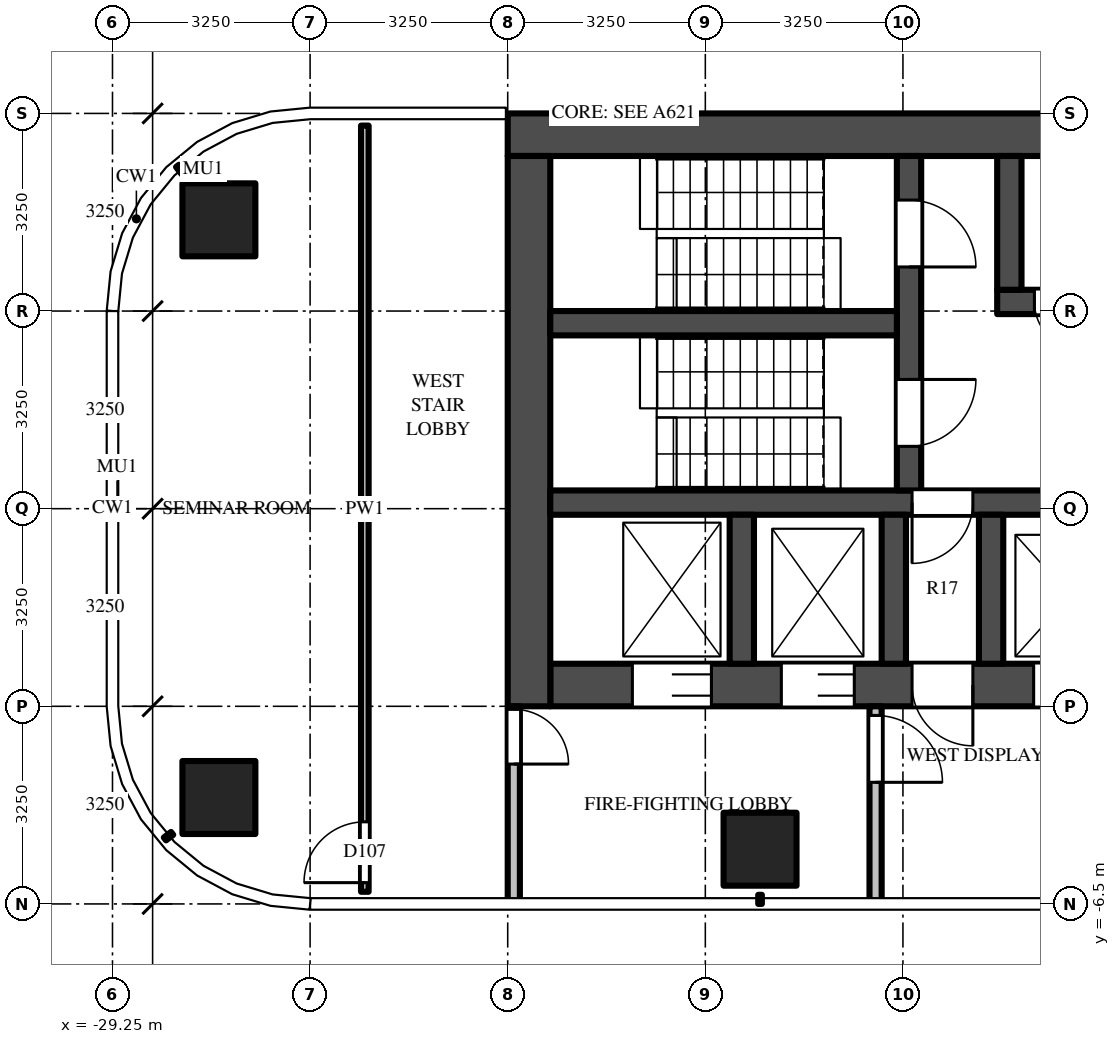
"""IFC4 building model, lengths in metres.
Left out: names, types, materials, properties, quantities, classifications, styles, units other than length and angle.
Written with IfcOpenShell. Run it as: python <this file> out.ifc"""

import sys

from ifc_helpers import new_model, si_unit, direction, frame, frame_2d, origin, origin_2d, place, context, subcontext, project, spatial, rectangle, extrude, source, transform, mapped, element, fill, save


model = new_model("IFC4")
c1 = context("Model", 3, precision=1e-05, world=origin(), true_north=direction((0.0, 1.0)))
c2 = subcontext(c1, "Body", "Model", "MODEL_VIEW")
j1 = project(units=[si_unit("LENGTHUNIT", "METRE"), si_unit("PLANEANGLEUNIT", "RADIAN")], contexts=[c1])
p1 = place(None, origin())
s1 = spatial("IfcSite", under=j1, at=p1, CompositionType="ELEMENT")
p2 = place(p1, origin())
s2 = spatial("IfcBuilding", under=s1, at=p2, CompositionType="ELEMENT")
p3 = place(p2, frame((0.0, 0.0, 173.7)))
s3 = spatial("IfcBuildingStorey", under=s2, at=p3, CompositionType="ELEMENT", Elevation=173.7)
m1 = source(origin(), c2, "Body", "SweptSolid", [
    extrude(rectangle(XDim=1.2, YDim=1.2, at=origin_2d()), origin(), (0.0, 0.0, 1.0), 3.9),
])
for number, where, z_axis, x_axis in (
    (1, (-18.6, -5.6, 0.0), (0.0, 0.0, 1.0), (1.0, 0.0, 0.0)),
    (2, (-27.5, -4.75, 0.0), (0.0, 0.0, 1.0), (1.0, 0.0, 0.0)),
    (3, (-27.5, 4.75, 0.0), (0.0, 0.0, 1.0), (1.0, 0.0, 0.0)),
):
    element("IfcColumn", number, at=place(p3, frame(where, z_axis=z_axis, x_axis=x_axis)), inside=s3, PredefinedType="COLUMN", context=c2, shape_type="MappedRepresentation", body=[
        mapped(m1, transform((0.0, 0.0, 0.0))),
    ])
m2 = source(origin(), c2, "Body", "SweptSolid", [
    extrude(rectangle(XDim=16.55, YDim=0.7, at=frame_2d((8.275, 0.0))), origin(), (0.0, 0.0, 1.0), 3.7),
])
p4 = place(p3, frame((-6.2, 6.15, 0.0), z_axis=(0.0, 0.0, 1.0), x_axis=(-1.0, 0.0, 0.0)))
e4 = element("IfcWall", 4, at=p4, inside=s3, PredefinedType="SHEAR", context=c2, shape_type="MappedRepresentation", body=[
    mapped(m2, transform((0.0, 0.0, 0.0))),
])
m3 = source(origin(), c2, "Body", "SweptSolid", [
    extrude(rectangle(XDim=14.85, YDim=0.7, at=frame_2d((7.425, 0.0))), origin(), (0.0, 0.0, 1.0), 3.7),
])
p5 = place(p3, frame((-7.2, -2.9, 0.0), z_axis=(0.0, 0.0, 1.0), x_axis=(-1.0, 0.0, 0.0)))
e5 = element("IfcWall", 5, at=p5, inside=s3, PredefinedType="SHEAR", context=c2, shape_type="MappedRepresentation", body=[
    mapped(m3, transform((0.0, 0.0, 0.0))),
])
m4 = source(origin(), c2, "Body", "SweptSolid", [
    extrude(rectangle(XDim=1.1, YDim=2.1, at=frame_2d((0.55, 1.05))), frame((0.0, 0.36, 0.0), z_axis=(0.0, -1.0, 0.0), x_axis=(1.0, 0.0, 0.0)), (0.0, 0.0, 1.0), 0.72),
])
p6 = place(p5, frame((0.55, 0.0, 0.0)))
e6 = element("IfcOpeningElement", 6, at=p6, cuts=e5, PredefinedType="OPENING", context=c2, shape_type="MappedRepresentation", body=[
    mapped(m4, transform((0.0, 0.0, 0.0))),
])
p7 = place(p5, frame((3.15, 0.0, 0.0)))
e7 = element("IfcOpeningElement", 7, at=p7, cuts=e5, PredefinedType="OPENING", context=c2, shape_type="MappedRepresentation", body=[
    mapped(m4, transform((0.0, 0.0, 0.0))),
])
m5 = source(origin(), c2, "Body", "SweptSolid", [
    extrude(rectangle(XDim=1.2, YDim=2.1, at=frame_2d((0.6, 1.05))), frame((0.0, 0.36, 0.0), z_axis=(0.0, -1.0, 0.0), x_axis=(1.0, 0.0, 0.0)), (0.0, 0.0, 1.0), 0.72),
])
p8 = place(p5, frame((5.7, 0.0, 0.0)))
e8 = element("IfcOpeningElement", 8, at=p8, cuts=e5, PredefinedType="OPENING", context=c2, shape_type="MappedRepresentation", body=[
    mapped(m5, transform((0.0, 0.0, 0.0))),
])
m6 = source(origin(), c2, "Body", "SweptSolid", [
    extrude(rectangle(XDim=1.3, YDim=2.1, at=frame_2d((0.65, 1.05))), frame((0.0, 0.36, 0.0), z_axis=(0.0, -1.0, 0.0), x_axis=(1.0, 0.0, 0.0)), (0.0, 0.0, 1.0), 0.72),
])
p9 = place(p5, frame((12.2, 0.0, 0.0)))
e9 = element("IfcOpeningElement", 9, at=p9, cuts=e5, PredefinedType="OPENING", context=c2, shape_type="MappedRepresentation", body=[
    mapped(m6, transform((0.0, 0.0, 0.0))),
])
p10 = place(p5, frame((9.85, 0.0, 0.0)))
e10 = element("IfcOpeningElement", 10, at=p10, cuts=e5, PredefinedType="OPENING", context=c2, shape_type="MappedRepresentation", body=[
    mapped(m5, transform((0.0, 0.0, 0.0))),
])
m7 = source(origin(), c2, "Body", "SweptSolid", [
    extrude(rectangle(XDim=1.0, YDim=2.1, at=frame_2d((0.5, 1.05))), frame((0.0, 0.36, 0.0), z_axis=(0.0, -1.0, 0.0), x_axis=(1.0, 0.0, 0.0)), (0.0, 0.0, 1.0), 0.72),
])
p11 = place(p5, frame((7.9, 0.0, 0.0)))
e11 = element("IfcOpeningElement", 11, at=p11, cuts=e5, PredefinedType="OPENING", context=c2, shape_type="MappedRepresentation", body=[
    mapped(m7, transform((0.0, 0.0, 0.0))),
])
m8 = source(origin(), c2, "Body", "SweptSolid", [
    extrude(rectangle(XDim=9.05, YDim=0.7, at=frame_2d((4.525, 0.0))), origin(), (0.0, 0.0, 1.0), 3.7),
])
p12 = place(p3, frame((-22.4, 5.8, 0.0), z_axis=(0.0, 0.0, 1.0), x_axis=(0.0, -1.0, 0.0)))
e12 = element("IfcWall", 12, at=p12, inside=s3, PredefinedType="SHEAR", context=c2, shape_type="MappedRepresentation", body=[
    mapped(m8, transform((0.0, 0.0, 0.0))),
])
m9 = source(origin(), c2, "Body", "SweptSolid", [
    extrude(rectangle(XDim=7.5, YDim=0.4, at=frame_2d((3.75, 0.0))), origin(), (0.0, 0.0, 1.0), 3.7),
])
p13 = place(p3, frame((-7.2, 3.4, 0.0), z_axis=(0.0, 0.0, 1.0), x_axis=(-1.0, 0.0, 0.0)))
e13 = element("IfcWall", 13, at=p13, inside=s3, PredefinedType="SHEAR", context=c2, shape_type="MappedRepresentation", body=[
    mapped(m9, transform((0.0, 0.0, 0.0))),
])
m10 = source(origin(), c2, "Body", "SweptSolid", [
    extrude(rectangle(XDim=1.0, YDim=2.1, at=frame_2d((0.5, 1.05))), frame((0.0, 0.21, 0.0), z_axis=(0.0, -1.0, 0.0), x_axis=(1.0, 0.0, 0.0)), (0.0, 0.0, 1.0), 0.42),
])
p14 = place(p13, frame((1.462, 0.0, 0.0)))
e14 = element("IfcOpeningElement", 14, at=p14, cuts=e13, PredefinedType="OPENING", context=c2, shape_type="MappedRepresentation", body=[
    mapped(m10, transform((0.0, 0.0, 0.0))),
])
m11 = source(origin(), c2, "Body", "SweptSolid", [
    extrude(rectangle(XDim=0.9, YDim=2.1, at=frame_2d((0.45, 1.05))), frame((0.0, 0.21, 0.0), z_axis=(0.0, -1.0, 0.0), x_axis=(1.0, 0.0, 0.0)), (0.0, 0.0, 1.0), 0.42),
])
p15 = place(p13, frame((4.45, 0.0, 0.0)))
e15 = element("IfcOpeningElement", 15, at=p15, cuts=e13, PredefinedType="OPENING", context=c2, shape_type="MappedRepresentation", body=[
    mapped(m11, transform((0.0, 0.0, 0.0))),
])
m12 = source(origin(), c2, "Body", "SweptSolid", [
    extrude(rectangle(XDim=0.8, YDim=2.1, at=frame_2d((0.4, 1.05))), frame((0.0, 0.21, 0.0), z_axis=(0.0, -1.0, 0.0), x_axis=(1.0, 0.0, 0.0)), (0.0, 0.0, 1.0), 0.42),
])
p16 = place(p13, frame((6.087, 0.0, 0.0)))
e16 = element("IfcOpeningElement", 16, at=p16, cuts=e13, PredefinedType="OPENING", context=c2, shape_type="MappedRepresentation", body=[
    mapped(m12, transform((0.0, 0.0, 0.0))),
])
m13 = source(origin(), c2, "Body", "SweptSolid", [
    extrude(rectangle(XDim=14.85, YDim=0.4, at=frame_2d((7.425, 0.0))), origin(), (0.0, 0.0, 1.0), 3.7),
])
p17 = place(p3, frame((-7.2, 0.1, 0.0), z_axis=(0.0, 0.0, 1.0), x_axis=(-1.0, 0.0, 0.0)))
e17 = element("IfcWall", 17, at=p17, inside=s3, PredefinedType="SHEAR", context=c2, shape_type="MappedRepresentation", body=[
    mapped(m13, transform((0.0, 0.0, 0.0))),
])
p18 = place(p17, frame((7.9, 0.0, 0.0)))
e18 = element("IfcOpeningElement", 18, at=p18, cuts=e17, PredefinedType="OPENING", context=c2, shape_type="MappedRepresentation", body=[
    mapped(m10, transform((0.0, 0.0, 0.0))),
])
m14 = source(origin(), c2, "Body", "SweptSolid", [
    extrude(rectangle(XDim=5.5, YDim=0.4, at=frame_2d((2.75, 0.0))), origin(), (0.0, 0.0, 1.0), 3.7),
])
p19 = place(p3, frame((-16.15, 5.8, 0.0), z_axis=(0.0, 0.0, 1.0), x_axis=(0.0, -1.0, 0.0)))
e19 = element("IfcWall", 19, at=p19, inside=s3, PredefinedType="SHEAR", context=c2, shape_type="MappedRepresentation", body=[
    mapped(m14, transform((0.0, 0.0, 0.0))),
])
m15 = source(origin(), c2, "Body", "SweptSolid", [
    extrude(rectangle(XDim=1.1, YDim=2.1, at=frame_2d((0.55, 1.05))), frame((0.0, 0.21, 0.0), z_axis=(0.0, -1.0, 0.0), x_axis=(1.0, 0.0, 0.0)), (0.0, 0.0, 1.0), 0.42),
])
p20 = place(p19, frame((0.725, 0.0, 0.0)))
e20 = element("IfcOpeningElement", 20, at=p20, cuts=e19, PredefinedType="OPENING", context=c2, shape_type="MappedRepresentation", body=[
    mapped(m15, transform((0.0, 0.0, 0.0))),
])
p21 = place(p19, frame((3.675, 0.0, 0.0)))
e21 = element("IfcOpeningElement", 21, at=p21, cuts=e19, PredefinedType="OPENING", context=c2, shape_type="MappedRepresentation", body=[
    mapped(m15, transform((0.0, 0.0, 0.0))),
])
m16 = source(origin(), c2, "Body", "SweptSolid", [
    extrude(rectangle(XDim=5.7, YDim=0.4, at=frame_2d((2.85, 0.0))), origin(), (0.0, 0.0, 1.0), 3.7),
])
p22 = place(p3, frame((-16.35, 3.05, 0.0), z_axis=(0.0, 0.0, 1.0), x_axis=(-1.0, 0.0, 0.0)))
e22 = element("IfcWall", 22, at=p22, inside=s3, PredefinedType="SHEAR", context=c2, shape_type="MappedRepresentation", body=[
    mapped(m16, transform((0.0, 0.0, 0.0))),
])
m17 = source(origin(), c2, "Body", "SweptSolid", [
    extrude(rectangle(XDim=2.2, YDim=0.4, at=frame_2d((1.1, 0.0))), origin(), (0.0, 0.0, 1.0), 3.7),
])
p23 = place(p3, frame((-14.5, 5.8, 0.0), z_axis=(0.0, 0.0, 1.0), x_axis=(0.0, -1.0, 0.0)))
e23 = element("IfcWall", 23, at=p23, inside=s3, PredefinedType="SHEAR", context=c2, shape_type="MappedRepresentation", body=[
    mapped(m17, transform((0.0, 0.0, 0.0))),
])
m18 = source(origin(), c2, "Body", "SweptSolid", [
    extrude(rectangle(XDim=2.45, YDim=0.4, at=frame_2d((1.225, 0.0))), origin(), (0.0, 0.0, 1.0), 3.7),
])
for number, where, z_axis, x_axis in (
    (24, (-14.8, -0.1, 0.0), (0.0, 0.0, 1.0), (0.0, -1.0, 0.0)),
    (25, (-16.4, -0.1, 0.0), (0.0, 0.0, 1.0), (0.0, -1.0, 0.0)),
    (26, (-18.9, -0.1, 0.0), (0.0, 0.0, 1.0), (0.0, -1.0, 0.0)),
):
    element("IfcWall", number, at=place(p3, frame(where, z_axis=z_axis, x_axis=x_axis)), inside=s3, PredefinedType="SHEAR", context=c2, shape_type="MappedRepresentation", body=[
        mapped(m18, transform((0.0, 0.0, 0.0))),
    ])
m19 = source(origin(), c2, "Body", "SweptSolid", [
    extrude(rectangle(XDim=3.25, YDim=0.2, at=frame_2d((1.625, 0.0))), origin(), (0.0, 0.0, 1.0), 3.7),
])
p24 = place(p3, frame((-16.7, -3.25, 0.0), z_axis=(0.0, 0.0, 1.0), x_axis=(0.0, -1.0, 0.0)))
e27 = element("IfcWall", 27, at=p24, inside=s3, PredefinedType="PARTITIONING", context=c2, shape_type="MappedRepresentation", body=[
    mapped(m19, transform((0.0, 0.0, 0.0))),
])
m20 = source(origin(), c2, "Body", "SweptSolid", [
    extrude(rectangle(XDim=1.1, YDim=2.1, at=frame_2d((0.55, 1.05))), frame((0.0, 0.11, 0.0), z_axis=(0.0, -1.0, 0.0), x_axis=(1.0, 0.0, 0.0)), (0.0, 0.0, 1.0), 0.22),
])
p25 = place(p24, frame((0.15, 0.0, 0.0)))
e28 = element("IfcOpeningElement", 28, at=p25, cuts=e27, PredefinedType="OPENING", context=c2, shape_type="MappedRepresentation", body=[
    mapped(m20, transform((0.0, 0.0, 0.0))),
])
p26 = place(p3, frame((-22.65, -3.25, 0.0), z_axis=(0.0, 0.0, 1.0), x_axis=(0.0, -1.0, 0.0)))
e29 = element("IfcWall", 29, at=p26, inside=s3, PredefinedType="PARTITIONING", context=c2, shape_type="MappedRepresentation", body=[
    mapped(m19, transform((0.0, 0.0, 0.0))),
])
m21 = source(origin(), c2, "Body", "SweptSolid", [
    extrude(rectangle(XDim=0.9, YDim=2.1, at=frame_2d((0.45, 1.05))), frame((0.0, 0.11, 0.0), z_axis=(0.0, -1.0, 0.0), x_axis=(1.0, 0.0, 0.0)), (0.0, 0.0, 1.0), 0.22),
])
p27 = place(p26, frame((0.05, 0.0, 0.0)))
e30 = element("IfcOpeningElement", 30, at=p27, cuts=e29, PredefinedType="OPENING", context=c2, shape_type="MappedRepresentation", body=[
    mapped(m21, transform((0.0, 0.0, 0.0))),
])
m22 = source(origin(), c2, "Body", "SweptSolid", [
    extrude(rectangle(XDim=12.6, YDim=0.125, at=frame_2d((6.3, 0.0))), origin(), (0.0, 0.0, 1.0), 2.78),
])
p28 = place(p3, frame((-25.1, -6.3, 0.0), z_axis=(0.0, 0.0, 1.0), x_axis=(0.0, 1.0, 0.0)))
e31 = element("IfcWall", 31, at=p28, inside=s3, PredefinedType="PARTITIONING", context=c2, shape_type="MappedRepresentation", body=[
    mapped(m22, transform((0.0, 0.0, 0.0))),
])
m23 = source(origin(), c2, "Body", "SweptSolid", [
    extrude(rectangle(XDim=1.0, YDim=2.1, at=frame_2d((0.5, 1.05))), frame((0.0, 0.073, 0.0), z_axis=(0.0, -1.0, 0.0), x_axis=(1.0, 0.0, 0.0)), (0.0, 0.0, 1.0), 0.145),
])
p29 = place(p28, frame((0.15, 0.0, 0.0)))
e32 = element("IfcOpeningElement", 32, at=p29, cuts=e31, PredefinedType="OPENING", context=c2, shape_type="MappedRepresentation", body=[
    mapped(m23, transform((0.0, 0.0, 0.0))),
])
m24 = source(origin(), c2, "Body", "SweptSolid", [
    extrude(rectangle(XDim=1.2, YDim=2.1, at=frame_2d((0.6, 1.05))), frame((0.0, -0.275, 0.0), z_axis=(0.0, -1.0, 0.0), x_axis=(1.0, 0.0, 0.0)), (0.0, 0.0, 1.0), 0.05),
])
p30 = place(p8, origin())
e33 = element("IfcDoor", 33, at=p30, inside=s3, OperationType="DOUBLE_DOOR_SLIDING", PredefinedType="DOOR", context=c2, shape_type="MappedRepresentation", body=[
    mapped(m24, transform((0.0, 0.0, 0.0))),
])
fill(e8, e33)
m25 = source(origin(), c2, "Body", "SweptSolid", [
    extrude(rectangle(XDim=1.3, YDim=2.1, at=frame_2d((0.65, 1.05))), frame((0.0, -0.275, 0.0), z_axis=(0.0, -1.0, 0.0), x_axis=(1.0, 0.0, 0.0)), (0.0, 0.0, 1.0), 0.05),
])
p31 = place(p9, origin())
e34 = element("IfcDoor", 34, at=p31, inside=s3, OperationType="DOUBLE_DOOR_SLIDING", PredefinedType="DOOR", context=c2, shape_type="MappedRepresentation", body=[
    mapped(m25, transform((0.0, 0.0, 0.0))),
])
fill(e9, e34)
p32 = place(p10, origin())
e35 = element("IfcDoor", 35, at=p32, inside=s3, OperationType="DOUBLE_DOOR_SLIDING", PredefinedType="DOOR", context=c2, shape_type="MappedRepresentation", body=[
    mapped(m24, transform((0.0, 0.0, 0.0))),
])
fill(e10, e35)
m26 = source(origin(), c2, "Body", "SweptSolid", [
    extrude(rectangle(XDim=1.1, YDim=2.1, at=frame_2d((0.55, 1.05))), frame((0.0, 0.025, 0.0), z_axis=(0.0, -1.0, 0.0), x_axis=(1.0, 0.0, 0.0)), (0.0, 0.0, 1.0), 0.05),
])
p33 = place(p20, origin())
e36 = element("IfcDoor", 36, at=p33, inside=s3, OperationType="SINGLE_SWING_RIGHT", PredefinedType="DOOR", context=c2, shape_type="MappedRepresentation", body=[
    mapped(m26, transform((0.0, 0.0, 0.0))),
])
fill(e20, e36)
p34 = place(p21, origin())
e37 = element("IfcDoor", 37, at=p34, inside=s3, OperationType="SINGLE_SWING_LEFT", PredefinedType="DOOR", context=c2, shape_type="MappedRepresentation", body=[
    mapped(m26, transform((0.0, 0.0, 0.0))),
])
fill(e21, e37)
m27 = source(origin(), c2, "Body", "SweptSolid", [
    extrude(rectangle(XDim=1.0, YDim=2.1, at=frame_2d((0.5, 1.05))), frame((0.0, 0.025, 0.0), z_axis=(0.0, -1.0, 0.0), x_axis=(1.0, 0.0, 0.0)), (0.0, 0.0, 1.0), 0.05),
])
p35 = place(p18, origin())
e38 = element("IfcDoor", 38, at=p35, inside=s3, OperationType="SINGLE_SWING_RIGHT", PredefinedType="DOOR", context=c2, shape_type="MappedRepresentation", body=[
    mapped(m27, transform((0.0, 0.0, 0.0))),
])
fill(e18, e38)
m28 = source(origin(), c2, "Body", "SweptSolid", [
    extrude(rectangle(XDim=1.0, YDim=2.1, at=frame_2d((0.5, 1.05))), frame((0.0, -0.275, 0.0), z_axis=(0.0, -1.0, 0.0), x_axis=(1.0, 0.0, 0.0)), (0.0, 0.0, 1.0), 0.05),
])
p36 = place(p11, origin())
e39 = element("IfcDoor", 39, at=p36, inside=s3, OperationType="SINGLE_SWING_LEFT", PredefinedType="DOOR", context=c2, shape_type="MappedRepresentation", body=[
    mapped(m28, transform((0.0, 0.0, 0.0))),
])
fill(e11, e39)
p37 = place(p25, origin())
e40 = element("IfcDoor", 40, at=p37, inside=s3, OperationType="SINGLE_SWING_RIGHT", PredefinedType="DOOR", context=c2, shape_type="MappedRepresentation", body=[
    mapped(m26, transform((0.0, 0.0, 0.0))),
])
fill(e28, e40)
m29 = source(origin(), c2, "Body", "SweptSolid", [
    extrude(rectangle(XDim=0.9, YDim=2.1, at=frame_2d((0.45, 1.05))), frame((0.0, 0.025, 0.0), z_axis=(0.0, -1.0, 0.0), x_axis=(1.0, 0.0, 0.0)), (0.0, 0.0, 1.0), 0.05),
])
p38 = place(p27, origin())
e41 = element("IfcDoor", 41, at=p38, inside=s3, OperationType="SINGLE_SWING_RIGHT", PredefinedType="DOOR", context=c2, shape_type="MappedRepresentation", body=[
    mapped(m29, transform((0.0, 0.0, 0.0))),
])
fill(e30, e41)
m30 = source(origin(), c2, "Body", "SweptSolid", [
    extrude(rectangle(XDim=0.8, YDim=2.1, at=frame_2d((0.4, 1.05))), frame((0.0, 0.025, 0.0), z_axis=(0.0, -1.0, 0.0), x_axis=(1.0, 0.0, 0.0)), (0.0, 0.0, 1.0), 0.05),
])
p39 = place(p16, origin())
e42 = element("IfcDoor", 42, at=p39, inside=s3, OperationType="SINGLE_SWING_LEFT", PredefinedType="DOOR", context=c2, shape_type="MappedRepresentation", body=[
    mapped(m30, transform((0.0, 0.0, 0.0))),
])
fill(e16, e42)
p40 = place(p29, origin())
e43 = element("IfcDoor", 43, at=p40, inside=s3, OperationType="SINGLE_SWING_LEFT", PredefinedType="DOOR", context=c2, shape_type="MappedRepresentation", body=[
    mapped(m27, transform((0.0, 0.0, 0.0))),
])
fill(e32, e43)
save(model, sys.argv[1])
